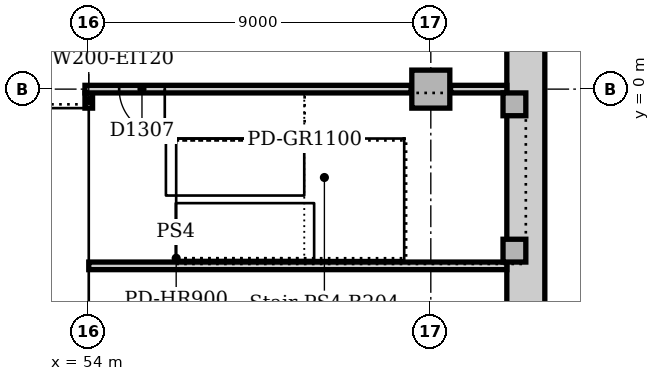
"""IFC4 building model, lengths in metres.
Left out: names, types, materials, properties, quantities, classifications, styles, units other than length and angle.
Written with IfcOpenShell. Run it as: python <this file> out.ifc"""

import sys

from ifc_helpers import new_model, si_unit, direction, frame, frame_2d, origin, origin_2d, place, context, subcontext, project, spatial, rectangle, extrude, element, fill, save


model = new_model("IFC4")
c1 = context("Model", 3, precision=1e-05, world=origin(), true_north=direction((0.0, 1.0)))
c2 = subcontext(c1, "Body", "Model", "MODEL_VIEW")
j1 = project(units=[si_unit("LENGTHUNIT", "METRE"), si_unit("PLANEANGLEUNIT", "RADIAN")], contexts=[c1])
p1 = place(None, origin())
s1 = spatial("IfcSite", under=j1, at=p1, CompositionType="ELEMENT")
p2 = place(p1, origin())
s2 = spatial("IfcBuilding", under=s1, at=p2, CompositionType="ELEMENT")
p3 = place(p2, frame((0.0, 0.0, -9.5)))
s3 = spatial("IfcBuildingStorey", under=s2, at=p3, CompositionType="ELEMENT", Elevation=-9.5)
p4 = place(p3, frame((65.5, 53.641, 0.0), z_axis=(0.0, 0.0, 1.0), x_axis=(0.0, -1.0, 0.0)))
e1 = element("IfcWall", 1, at=p4, inside=s3, PredefinedType="SOLIDWALL", context=c2, shape_type="SweptSolid", body=[
    extrude(rectangle(XDim=62.282, YDim=1.0, at=frame_2d((31.141, 0.0))), origin(), (0.0, 0.0, 1.0), 4.5),
])
p5 = place(p3, frame((63.0, 0.0, 0.0), z_axis=(0.0, 0.0, 1.0), x_axis=(1.0, 0.0, 0.0)))
e2 = element("IfcColumn", 2, at=p5, inside=s3, PredefinedType="COLUMN", context=c2, shape_type="SweptSolid", body=[
    extrude(rectangle(XDim=1.0, YDim=1.0, at=origin_2d()), origin(), (0.0, 0.0, 1.0), 4.15),
])
for number, where, z_axis, x_axis in (
    (3, (65.2, -4.25, 0.0), (0.0, 0.0, 1.0), (1.0, 0.0, 0.0)),
    (4, (65.2, -0.4, 0.0), (0.0, 0.0, 1.0), (1.0, 0.0, 0.0)),
):
    element("IfcColumn", number, at=place(p3, frame(where, z_axis=z_axis, x_axis=x_axis)), inside=s3, PredefinedType="COLUMN", context=c2, shape_type="SweptSolid", body=[
        extrude(rectangle(XDim=0.6, YDim=0.6, at=origin_2d()), origin(), (0.0, 0.0, 1.0), 4.5),
    ])
p6 = place(p3, frame((54.0, -0.5, 0.0), z_axis=(0.0, 0.0, 1.0), x_axis=(0.0, 1.0, 0.0)))
e5 = element("IfcWall", 5, at=p6, inside=s3, PredefinedType="SOLIDWALL", context=c2, shape_type="SweptSolid", body=[
    extrude(rectangle(XDim=0.4, YDim=0.2, at=frame_2d((0.2, 0.0))), origin(), (0.0, 0.0, 1.0), 4.15),
])
p7 = place(p3, frame((53.9, 0.0, 0.0), z_axis=(0.0, 0.0, 1.0), x_axis=(1.0, 0.0, 0.0)))
e6 = element("IfcWall", 6, at=p7, inside=s3, PredefinedType="SOLIDWALL", context=c2, shape_type="SweptSolid", body=[
    extrude(rectangle(XDim=8.58, YDim=0.2, at=frame_2d((4.29, 0.0))), origin(), (0.0, 0.0, 1.0), 4.15),
])
p8 = place(p7, frame((0.9, 0.0, 0.0)))
e7 = element("IfcOpeningElement", 7, at=p8, cuts=e6, PredefinedType="OPENING", context=c2, shape_type="SweptSolid", body=[
    extrude(rectangle(XDim=1.2, YDim=2.1, at=frame_2d((0.6, 1.05))), frame((0.0, 0.11, 0.0), z_axis=(0.0, -1.0, 0.0), x_axis=(1.0, 0.0, 0.0)), (0.0, 0.0, 1.0), 0.22),
])
p9 = place(p3, frame((63.52, 0.0, 0.0), z_axis=(0.0, 0.0, 1.0), x_axis=(1.0, 0.0, 0.0)))
e8 = element("IfcWall", 8, at=p9, inside=s3, PredefinedType="SOLIDWALL", context=c2, shape_type="SweptSolid", body=[
    extrude(rectangle(XDim=1.48, YDim=0.2, at=frame_2d((0.74, 0.0))), origin(), (0.0, 0.0, 1.0), 4.15),
])
p10 = place(p3, frame((54.0, -4.65, 0.0), z_axis=(0.0, 0.0, 1.0), x_axis=(1.0, 0.0, 0.0)))
e9 = element("IfcWall", 9, at=p10, inside=s3, PredefinedType="SOLIDWALL", context=c2, shape_type="SweptSolid", body=[
    extrude(rectangle(XDim=11.0, YDim=0.2, at=frame_2d((5.5, 0.0))), origin(), (0.0, 0.0, 1.0), 4.15),
])
p11 = place(p8, frame((1.2, 0.0, 0.0), z_axis=(0.0, 0.0, 1.0), x_axis=(-1.0, 0.0, 0.0)))
e10 = element("IfcDoor", 10, at=p11, inside=s3, OperationType="SINGLE_SWING_LEFT", PredefinedType="DOOR", context=c2, shape_type="SweptSolid", body=[
    extrude(rectangle(XDim=1.2, YDim=2.1, at=frame_2d((0.6, 1.05))), frame((0.0, 0.025, 0.0), z_axis=(0.0, -1.0, 0.0), x_axis=(1.0, 0.0, 0.0)), (0.0, 0.0, 1.0), 0.05),
])
fill(e7, e10)
save(model, sys.argv[1])
